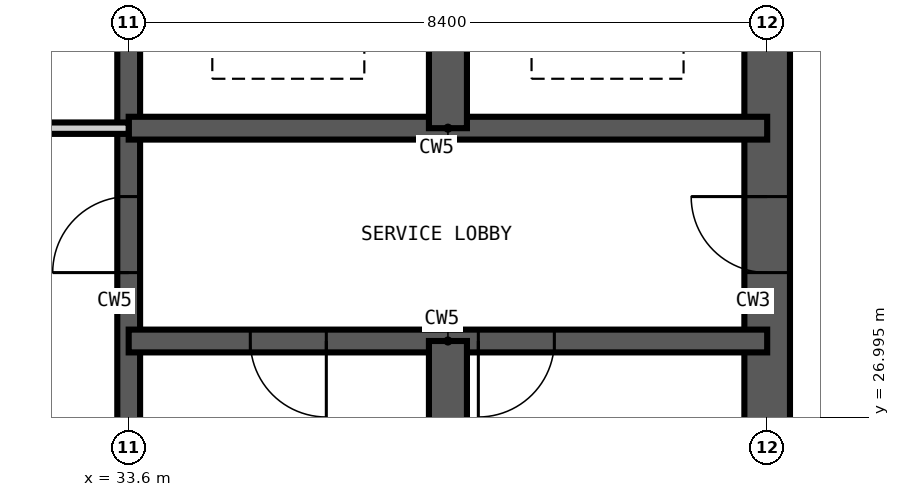
"""IFC4 building model, lengths in metres.
Left out: names, types, materials, properties, quantities, classifications, styles, units other than length and angle.
Written with IfcOpenShell. Run it as: python <this file> out.ifc"""

import sys

from ifc_helpers import new_model, si_unit, direction, frame, frame_2d, origin, place, context, subcontext, project, spatial, rectangle, extrude, element, fill, save


model = new_model("IFC4")
c1 = context("Model", 3, precision=1e-05, world=origin(), true_north=direction((0.0, 1.0)))
c2 = subcontext(c1, "Body", "Model", "MODEL_VIEW")
j1 = project(units=[si_unit("LENGTHUNIT", "METRE"), si_unit("PLANEANGLEUNIT", "RADIAN")], contexts=[c1])
p1 = place(None, origin())
s1 = spatial("IfcSite", under=j1, at=p1, CompositionType="ELEMENT")
p2 = place(p1, origin())
s2 = spatial("IfcBuilding", under=s1, at=p2, CompositionType="ELEMENT")
p3 = place(p2, frame((0.0, 0.0, 198.6)))
s3 = spatial("IfcBuildingStorey", under=s2, at=p3, CompositionType="ELEMENT", Elevation=198.6)
p4 = place(p3, frame((42.0, 17.1, -0.35), z_axis=(0.0, 0.0, 1.0), x_axis=(0.0, 1.0, 0.0)))
e1 = element("IfcWall", 1, at=p4, inside=s3, PredefinedType="SHEAR", context=c2, shape_type="SweptSolid", body=[
    extrude(rectangle(XDim=24.6, YDim=0.6, at=frame_2d((12.3, 0.0))), origin(), (0.0, 0.0, 1.0), 3.6),
])
p5 = place(p4, frame((0.5, 0.0, 0.35)))
e2 = element("IfcOpeningElement", 2, at=p5, cuts=e1, PredefinedType="OPENING", context=c2, shape_type="SweptSolid", body=[
    extrude(rectangle(XDim=1.2, YDim=2.2, at=frame_2d((0.6, 1.1))), frame((0.0, 0.31, 0.0), z_axis=(0.0, -1.0, 0.0), x_axis=(1.0, 0.0, 0.0)), (0.0, 0.0, 1.0), 0.62),
])
p6 = place(p4, frame((11.8, 0.0, 0.35)))
e3 = element("IfcOpeningElement", 3, at=p6, cuts=e1, PredefinedType="OPENING", context=c2, shape_type="SweptSolid", body=[
    extrude(rectangle(XDim=1.0, YDim=2.1, at=frame_2d((0.5, 1.05))), frame((0.0, 0.31, 0.0), z_axis=(0.0, -1.0, 0.0), x_axis=(1.0, 0.0, 0.0)), (0.0, 0.0, 1.0), 0.62),
])
p7 = place(p4, frame((20.2, 0.0, 0.35)))
e4 = element("IfcOpeningElement", 4, at=p7, cuts=e1, PredefinedType="OPENING", context=c2, shape_type="SweptSolid", body=[
    extrude(rectangle(XDim=1.0, YDim=2.1, at=frame_2d((0.5, 1.05))), frame((0.0, 0.31, 0.0), z_axis=(0.0, -1.0, 0.0), x_axis=(1.0, 0.0, 0.0)), (0.0, 0.0, 1.0), 0.62),
])
p8 = place(p3, frame((33.6, 16.8, -0.35), z_axis=(0.0, 0.0, 1.0), x_axis=(0.0, 1.0, 0.0)))
e5 = element("IfcWall", 5, at=p8, inside=s3, PredefinedType="SHEAR", context=c2, shape_type="SweptSolid", body=[
    extrude(rectangle(XDim=25.2, YDim=0.3, at=frame_2d((12.6, 0.0))), origin(), (0.0, 0.0, 1.0), 3.6),
])
p9 = place(p8, frame((22.5, 0.0, 0.35)))
e6 = element("IfcOpeningElement", 6, at=p9, cuts=e5, PredefinedType="OPENING", context=c2, shape_type="SweptSolid", body=[
    extrude(rectangle(XDim=1.2, YDim=2.2, at=frame_2d((0.6, 1.1))), frame((0.0, 0.16, 0.0), z_axis=(0.0, -1.0, 0.0), x_axis=(1.0, 0.0, 0.0)), (0.0, 0.0, 1.0), 0.32),
])
p10 = place(p8, frame((18.3, 0.0, 0.35)))
e7 = element("IfcOpeningElement", 7, at=p10, cuts=e5, PredefinedType="OPENING", context=c2, shape_type="SweptSolid", body=[
    extrude(rectangle(XDim=1.2, YDim=2.2, at=frame_2d((0.6, 1.1))), frame((0.0, 0.16, 0.0), z_axis=(0.0, -1.0, 0.0), x_axis=(1.0, 0.0, 0.0)), (0.0, 0.0, 1.0), 0.32),
])
p11 = place(p8, frame((12.1, 0.0, 0.35)))
e8 = element("IfcOpeningElement", 8, at=p11, cuts=e5, PredefinedType="OPENING", context=c2, shape_type="SweptSolid", body=[
    extrude(rectangle(XDim=1.0, YDim=2.1, at=frame_2d((0.5, 1.05))), frame((0.0, 0.16, 0.0), z_axis=(0.0, -1.0, 0.0), x_axis=(1.0, 0.0, 0.0)), (0.0, 0.0, 1.0), 0.32),
])
p12 = place(p3, frame((33.6, 28.0, -0.35), z_axis=(0.0, 0.0, 1.0), x_axis=(1.0, 0.0, 0.0)))
e9 = element("IfcWall", 9, at=p12, inside=s3, PredefinedType="SHEAR", context=c2, shape_type="SweptSolid", body=[
    extrude(rectangle(XDim=8.4, YDim=0.3, at=frame_2d((4.2, 0.0))), origin(), (0.0, 0.0, 1.0), 3.6),
])
p13 = place(p12, frame((1.6, 0.0, 0.35)))
e10 = element("IfcOpeningElement", 10, at=p13, cuts=e9, PredefinedType="OPENING", context=c2, shape_type="SweptSolid", body=[
    extrude(rectangle(XDim=1.0, YDim=2.1, at=frame_2d((0.5, 1.05))), frame((0.0, 0.16, 0.0), z_axis=(0.0, -1.0, 0.0), x_axis=(1.0, 0.0, 0.0)), (0.0, 0.0, 1.0), 0.32),
])
p14 = place(p12, frame((4.6, 0.0, 0.35)))
e11 = element("IfcOpeningElement", 11, at=p14, cuts=e9, PredefinedType="OPENING", context=c2, shape_type="SweptSolid", body=[
    extrude(rectangle(XDim=1.0, YDim=2.1, at=frame_2d((0.5, 1.05))), frame((0.0, 0.16, 0.0), z_axis=(0.0, -1.0, 0.0), x_axis=(1.0, 0.0, 0.0)), (0.0, 0.0, 1.0), 0.32),
])
p15 = place(p3, frame((33.6, 30.8, -0.35), z_axis=(0.0, 0.0, 1.0), x_axis=(1.0, 0.0, 0.0)))
e12 = element("IfcWall", 12, at=p15, inside=s3, PredefinedType="SHEAR", context=c2, shape_type="SweptSolid", body=[
    extrude(rectangle(XDim=8.4, YDim=0.3, at=frame_2d((4.2, 0.0))), origin(), (0.0, 0.0, 1.0), 3.6),
])
p16 = place(p3, frame((37.8, 16.8, -0.35), z_axis=(0.0, 0.0, 1.0), x_axis=(0.0, 1.0, 0.0)))
e13 = element("IfcWall", 13, at=p16, inside=s3, PredefinedType="SHEAR", context=c2, shape_type="SweptSolid", body=[
    extrude(rectangle(XDim=11.2, YDim=0.5, at=frame_2d((5.6, 0.0))), origin(), (0.0, 0.0, 1.0), 3.6),
])
p17 = place(p3, frame((37.8, 30.8, -0.35), z_axis=(0.0, 0.0, 1.0), x_axis=(0.0, 1.0, 0.0)))
e14 = element("IfcWall", 14, at=p17, inside=s3, PredefinedType="SHEAR", context=c2, shape_type="SweptSolid", body=[
    extrude(rectangle(XDim=2.8, YDim=0.5, at=frame_2d((1.4, 0.0))), origin(), (0.0, 0.0, 1.0), 3.6),
])
p18 = place(p3, frame((25.2, 30.8, 0.0), z_axis=(0.0, 0.0, 1.0), x_axis=(1.0, 0.0, 0.0)))
e15 = element("IfcWall", 15, at=p18, inside=s3, PredefinedType="PARTITIONING", context=c2, shape_type="SweptSolid", body=[
    extrude(rectangle(XDim=8.4, YDim=0.15, at=frame_2d((4.2, 0.0))), origin(), (0.0, 0.0, 1.0), 3.25),
])
p19 = place(p18, frame((3.7, 0.0, 0.0)))
e16 = element("IfcOpeningElement", 16, at=p19, cuts=e15, PredefinedType="OPENING", context=c2, shape_type="SweptSolid", body=[
    extrude(rectangle(XDim=1.0, YDim=2.1, at=frame_2d((0.5, 1.05))), frame((0.0, 0.085, 0.0), z_axis=(0.0, -1.0, 0.0), x_axis=(1.0, 0.0, 0.0)), (0.0, 0.0, 1.0), 0.17),
])
p20 = place(p11, origin())
e17 = element("IfcDoor", 17, at=p20, inside=s3, OperationType="SINGLE_SWING_LEFT", PredefinedType="DOOR", context=c2, shape_type="SweptSolid", body=[
    extrude(rectangle(XDim=1.0, YDim=2.1, at=frame_2d((0.5, 1.05))), frame((0.0, 0.025, 0.0), z_axis=(0.0, -1.0, 0.0), x_axis=(1.0, 0.0, 0.0)), (0.0, 0.0, 1.0), 0.05),
])
fill(e8, e17)
p21 = place(p13, frame((1.0, 0.0, 0.0), z_axis=(0.0, 0.0, 1.0), x_axis=(-1.0, 0.0, 0.0)))
e18 = element("IfcDoor", 18, at=p21, inside=s3, OperationType="SINGLE_SWING_LEFT", PredefinedType="DOOR", context=c2, shape_type="SweptSolid", body=[
    extrude(rectangle(XDim=1.0, YDim=2.1, at=frame_2d((0.5, 1.05))), frame((0.0, 0.025, 0.0), z_axis=(0.0, -1.0, 0.0), x_axis=(1.0, 0.0, 0.0)), (0.0, 0.0, 1.0), 0.05),
])
fill(e10, e18)
p22 = place(p14, frame((1.0, 0.0, 0.0), z_axis=(0.0, 0.0, 1.0), x_axis=(-1.0, 0.0, 0.0)))
e19 = element("IfcDoor", 19, at=p22, inside=s3, OperationType="SINGLE_SWING_RIGHT", PredefinedType="DOOR", context=c2, shape_type="SweptSolid", body=[
    extrude(rectangle(XDim=1.0, YDim=2.1, at=frame_2d((0.5, 1.05))), frame((0.0, 0.025, 0.0), z_axis=(0.0, -1.0, 0.0), x_axis=(1.0, 0.0, 0.0)), (0.0, 0.0, 1.0), 0.05),
])
fill(e11, e19)
p23 = place(p6, origin())
e20 = element("IfcDoor", 20, at=p23, inside=s3, OperationType="SINGLE_SWING_RIGHT", PredefinedType="DOOR", context=c2, shape_type="SweptSolid", body=[
    extrude(rectangle(XDim=1.0, YDim=2.1, at=frame_2d((0.5, 1.05))), frame((0.0, 0.025, 0.0), z_axis=(0.0, -1.0, 0.0), x_axis=(1.0, 0.0, 0.0)), (0.0, 0.0, 1.0), 0.05),
])
fill(e3, e20)
save(model, sys.argv[1])
